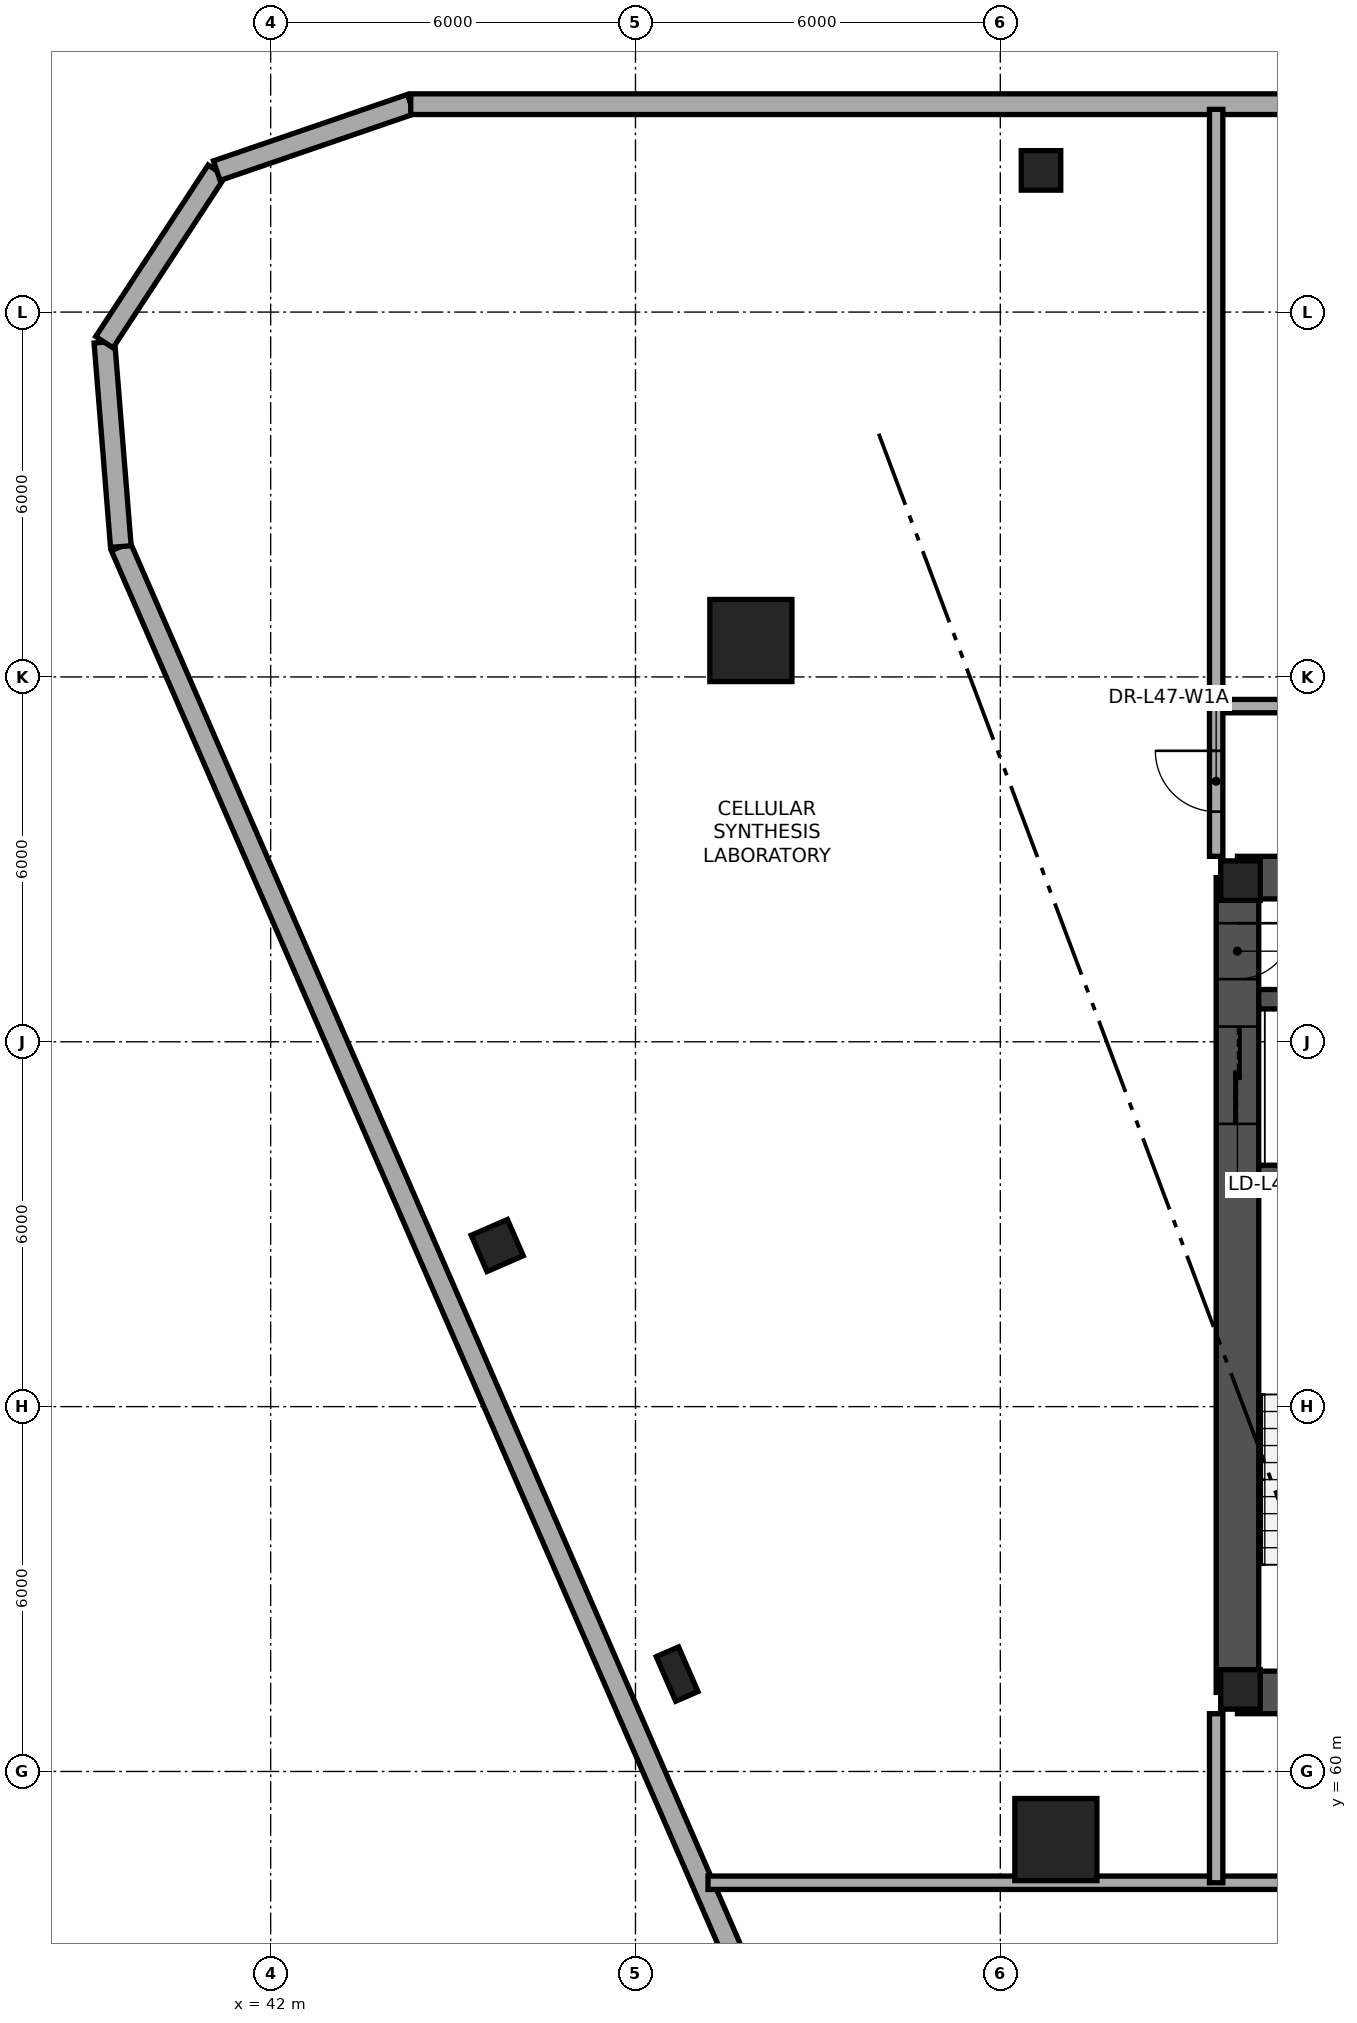
"""IFC4 building model, lengths in metres.
Left out: names, types, materials, properties, quantities, classifications, styles, units other than length and angle.
Written with IfcOpenShell. Run it as: python <this file> out.ifc"""

import sys

from ifc_helpers import new_model, si_unit, direction, frame, frame_2d, origin, origin_2d, place, context, subcontext, project, spatial, rectangle, extrude, element, fill, save


model = new_model("IFC4")
c1 = context("Model", 3, precision=1e-05, world=origin(), true_north=direction((0.0, 1.0)))
c2 = subcontext(c1, "Body", "Model", "MODEL_VIEW")
j1 = project(units=[si_unit("LENGTHUNIT", "METRE"), si_unit("PLANEANGLEUNIT", "RADIAN")], contexts=[c1])
p1 = place(None, origin())
s1 = spatial("IfcSite", under=j1, at=p1, CompositionType="ELEMENT")
p2 = place(p1, origin())
s2 = spatial("IfcBuilding", under=s1, at=p2, CompositionType="ELEMENT")
p3 = place(p2, frame((0.0, 0.0, 179.4)))
s3 = spatial("IfcBuildingStorey", under=s2, at=p3, CompositionType="ELEMENT", Elevation=179.4)
p4 = place(p3, frame((57.9, 61.3, 0.0), z_axis=(0.0, 0.0, 1.0), x_axis=(1.0, 0.0, 0.0)))
e1 = element("IfcWall", 1, at=p4, inside=s3, PredefinedType="SHEAR", context=c2, shape_type="SweptSolid", body=[
    extrude(rectangle(XDim=16.2, YDim=0.7, at=frame_2d((8.1, 0.0))), origin(), (0.0, 0.0, 1.0), 3.65),
])
p5 = place(p4, frame((1.35, 0.0, 0.0)))
e2 = element("IfcOpeningElement", 2, at=p5, cuts=e1, PredefinedType="OPENING", context=c2, shape_type="SweptSolid", body=[
    extrude(rectangle(XDim=1.15, YDim=2.15, at=frame_2d((0.575, 1.075))), frame((0.0, 0.36, 0.0), z_axis=(0.0, -1.0, 0.0), x_axis=(1.0, 0.0, 0.0)), (0.0, 0.0, 1.0), 0.72),
])
p6 = place(p4, frame((6.1, 0.0, 0.0)))
e3 = element("IfcOpeningElement", 3, at=p6, cuts=e1, PredefinedType="OPENING", context=c2, shape_type="SweptSolid", body=[
    extrude(rectangle(XDim=1.6, YDim=2.15, at=frame_2d((0.8, 1.075))), frame((0.0, 0.36, 0.0), z_axis=(0.0, -1.0, 0.0), x_axis=(1.0, 0.0, 0.0)), (0.0, 0.0, 1.0), 0.72),
])
p7 = place(p4, frame((13.55, 0.0, 0.0)))
e4 = element("IfcOpeningElement", 4, at=p7, cuts=e1, PredefinedType="OPENING", context=c2, shape_type="SweptSolid", body=[
    extrude(rectangle(XDim=1.15, YDim=2.15, at=frame_2d((0.575, 1.075))), frame((0.0, 0.36, 0.0), z_axis=(0.0, -1.0, 0.0), x_axis=(1.0, 0.0, 0.0)), (0.0, 0.0, 1.0), 0.72),
])
p8 = place(p3, frame((64.85, 74.7, 0.0), z_axis=(0.0, 0.0, 1.0), x_axis=(-1.0, 0.0, 0.0)))
e5 = element("IfcWall", 5, at=p8, inside=s3, PredefinedType="SHEAR", context=c2, shape_type="SweptSolid", body=[
    extrude(rectangle(XDim=6.95, YDim=0.7, at=frame_2d((3.475, 0.0))), origin(), (0.0, 0.0, 1.0), 3.65),
])
p9 = place(p3, frame((57.9, 74.7, 0.0), z_axis=(0.0, 0.0, 1.0), x_axis=(0.0, -1.0, 0.0)))
e6 = element("IfcWall", 6, at=p9, inside=s3, PredefinedType="SHEAR", context=c2, shape_type="SweptSolid", body=[
    extrude(rectangle(XDim=13.4, YDim=0.7, at=frame_2d((6.7, 0.0))), origin(), (0.0, 0.0, 1.0), 3.65),
])
p10 = place(p9, frame((0.75, 0.0, 0.0)))
e7 = element("IfcOpeningElement", 7, at=p10, cuts=e6, PredefinedType="OPENING", context=c2, shape_type="SweptSolid", body=[
    extrude(rectangle(XDim=0.92, YDim=2.05, at=frame_2d((0.46, 1.025))), frame((0.0, 0.36, 0.0), z_axis=(0.0, -1.0, 0.0), x_axis=(1.0, 0.0, 0.0)), (0.0, 0.0, 1.0), 0.72),
])
p11 = place(p9, frame((2.45, 0.0, 0.0)))
e8 = element("IfcOpeningElement", 8, at=p11, cuts=e6, PredefinedType="OPENING", context=c2, shape_type="SweptSolid", body=[
    extrude(rectangle(XDim=1.6, YDim=2.3, at=frame_2d((0.8, 1.15))), frame((0.0, 0.36, 0.0), z_axis=(0.0, -1.0, 0.0), x_axis=(1.0, 0.0, 0.0)), (0.0, 0.0, 1.0), 0.72),
])
for number, where, z_axis, x_axis in (
    (9, (58.25, 69.81, 0.0), (0.0, 0.0, 1.0), (1.0, 0.0, 0.0)),
    (10, (58.25, 72.7, 0.0), (0.0, 0.0, 1.0), (1.0, 0.0, 0.0)),
):
    element("IfcWall", number, at=place(p3, frame(where, z_axis=z_axis, x_axis=x_axis)), inside=s3, PredefinedType="SHEAR", context=c2, shape_type="SweptSolid", body=[
        extrude(rectangle(XDim=3.84, YDim=0.32, at=frame_2d((1.92, 0.0))), origin(), (0.0, 0.0, 1.0), 3.65),
    ])
for number, where, z_axis, x_axis in (
    (11, (57.95, 61.35, 0.0), (0.0, 0.0, 1.0), (1.0, 0.0, 0.0)),
    (12, (57.95, 74.65, 0.0), (0.0, 0.0, 1.0), (1.0, 0.0, 0.0)),
):
    element("IfcColumn", number, at=place(p3, frame(where, z_axis=z_axis, x_axis=x_axis)), inside=s3, PredefinedType="COLUMN", context=c2, shape_type="SweptSolid", body=[
        extrude(rectangle(XDim=0.65, YDim=0.65, at=origin_2d()), origin(), (0.0, 0.0, 1.0), 3.65),
    ])
for number, where, z_axis, x_axis in (
    (13, (49.898, 78.599, 0.0), (0.0, 0.0, 1.0), (1.0, 0.0, 0.0)),
    (14, (54.914, 58.88, 0.0), (0.0, 0.0, 1.0), (1.0, 0.0, 0.0)),
):
    element("IfcColumn", number, at=place(p3, frame(where, z_axis=z_axis, x_axis=x_axis)), inside=s3, PredefinedType="COLUMN", context=c2, shape_type="SweptSolid", body=[
        extrude(rectangle(XDim=1.35, YDim=1.35, at=origin_2d()), origin(), (0.0, 0.0, 1.0), 3.65),
    ])
p12 = place(p3, frame((54.62, 86.391, 0.003), z_axis=(0.026841076243, -0.033534611465, 0.999077067328), x_axis=(-0.780716755404, -0.624885067698, 0.0)))
e15 = element("IfcColumn", 15, at=p12, inside=s3, PredefinedType="COLUMN", context=c2, shape_type="SweptSolid", body=[
    extrude(rectangle(XDim=0.65, YDim=0.65, at=origin_2d()), origin(), (0.0, 0.0, 1.0), 3.647),
])
p13 = place(p3, frame((45.654, 68.66, 0.003), z_axis=(0.039229493406, -0.00569028488, 0.999214024874), x_axis=(0.963969673558, 0.263517553175, -0.036345118363)))
e16 = element("IfcColumn", 16, at=p13, inside=s3, PredefinedType="COLUMN", context=c2, shape_type="SweptSolid", body=[
    extrude(rectangle(XDim=0.65, YDim=0.65, at=origin_2d()), origin(), (0.0, 0.0, 1.0), 3.647),
])
p14 = place(p3, frame((48.626, 61.582, 0.003), z_axis=(0.032006476949, 0.010512587617, 0.999432374368), x_axis=(0.746040809026, 0.665183443624, -0.030888470278)))
e17 = element("IfcColumn", 17, at=p14, inside=s3, PredefinedType="PILASTER", context=c2, shape_type="SweptSolid", body=[
    extrude(rectangle(XDim=0.8, YDim=0.4, at=origin_2d()), origin(), (0.0, 0.0, 1.0), 3.646),
])
p15 = place(p3, frame((61.232, 30.296, 0.0), z_axis=(0.0, 0.0, 1.0), x_axis=(-0.399091286562, 0.916911197985, 0.0)))
e18 = element("IfcWall", 18, at=p15, inside=s3, PredefinedType="STANDARD", context=c2, shape_type="SweptSolid", body=[
    extrude(rectangle(XDim=54.364, YDim=0.34, at=frame_2d((27.182, 0.0))), origin(), (0.0, 0.0, 1.0), 0.85),
])
for number, where, z_axis, x_axis in (
    (19, (39.536, 80.144, 0.0), (0.0, 0.0, 1.0), (-0.08, 0.997, 0.0)),
    (20, (39.265, 83.505, 0.0), (0.0, 0.0, 1.0), (0.548, 0.836, 0.0)),
):
    element("IfcWall", number, at=place(p3, frame(where, z_axis=z_axis, x_axis=x_axis)), inside=s3, PredefinedType="STANDARD", context=c2, shape_type="SweptSolid", body=[
        extrude(rectangle(XDim=3.372, YDim=0.34, at=frame_2d((1.686, 0.0))), origin(), (0.0, 0.0, 1.0), 3.4),
    ])
p16 = place(p3, frame((41.114, 86.325, 0.0), z_axis=(0.0, 0.0, 1.0), x_axis=(0.945963079191, 0.324274348056, 0.0)))
e21 = element("IfcWall", 21, at=p16, inside=s3, PredefinedType="STANDARD", context=c2, shape_type="SweptSolid", body=[
    extrude(rectangle(XDim=3.372, YDim=0.34, at=frame_2d((1.686, 0.0))), origin(), (0.0, 0.0, 1.0), 3.4),
])
p17 = place(p3, frame((44.304, 87.419, 0.0), z_axis=(0.0, 0.0, 1.0), x_axis=(1.0, 0.0, 0.0)))
e22 = element("IfcWall", 22, at=p17, inside=s3, PredefinedType="STANDARD", context=c2, shape_type="SweptSolid", body=[
    extrude(rectangle(XDim=43.393, YDim=0.34, at=frame_2d((21.696, 0.0))), origin(), (0.0, 0.0, 1.0), 0.85),
])
p18 = place(p3, frame((57.55, 77.52, 0.0), z_axis=(0.0, 0.0, 1.0), x_axis=(1.0, 0.0, 0.0)))
e23 = element("IfcWall", 23, at=p18, inside=s3, PredefinedType="PARTITIONING", context=c2, shape_type="SweptSolid", body=[
    extrude(rectangle(XDim=33.679, YDim=0.22, at=frame_2d((16.84, 0.0))), origin(), (0.0, 0.0, 1.0), 2.6),
])
p19 = place(p18, frame((11.21, 0.0, 0.0)))
e24 = element("IfcOpeningElement", 24, at=p19, cuts=e23, PredefinedType="OPENING", context=c2, shape_type="SweptSolid", body=[
    extrude(rectangle(XDim=0.98, YDim=2.1, at=frame_2d((0.49, 1.05))), frame((0.0, 0.12, 0.0), z_axis=(0.0, -1.0, 0.0), x_axis=(1.0, 0.0, 0.0)), (0.0, 0.0, 1.0), 0.24),
])
p20 = place(p18, frame((14.035, 0.0, 0.0)))
e25 = element("IfcOpeningElement", 25, at=p20, cuts=e23, PredefinedType="OPENING", context=c2, shape_type="SweptSolid", body=[
    extrude(rectangle(XDim=0.98, YDim=2.1, at=frame_2d((0.49, 1.05))), frame((0.0, 0.12, 0.0), z_axis=(0.0, -1.0, 0.0), x_axis=(1.0, 0.0, 0.0)), (0.0, 0.0, 1.0), 0.24),
])
p21 = place(p18, frame((3.1, 0.0, 0.0)))
e26 = element("IfcOpeningElement", 26, at=p21, cuts=e23, PredefinedType="OPENING", context=c2, shape_type="SweptSolid", body=[
    extrude(rectangle(XDim=1.0, YDim=2.1, at=frame_2d((0.5, 1.05))), frame((0.0, 0.12, 0.0), z_axis=(0.0, -1.0, 0.0), x_axis=(1.0, 0.0, 0.0)), (0.0, 0.0, 1.0), 0.24),
])
p22 = place(p18, frame((8.135, 0.0, 0.0)))
e27 = element("IfcOpeningElement", 27, at=p22, cuts=e23, PredefinedType="OPENING", context=c2, shape_type="SweptSolid", body=[
    extrude(rectangle(XDim=1.0, YDim=2.1, at=frame_2d((0.5, 1.05))), frame((0.0, 0.12, 0.0), z_axis=(0.0, -1.0, 0.0), x_axis=(1.0, 0.0, 0.0)), (0.0, 0.0, 1.0), 0.24),
])
p23 = place(p18, frame((21.401, 0.0, 0.0)))
e28 = element("IfcOpeningElement", 28, at=p23, cuts=e23, PredefinedType="OPENING", context=c2, shape_type="SweptSolid", body=[
    extrude(rectangle(XDim=1.0, YDim=2.1, at=frame_2d((0.5, 1.05))), frame((0.0, 0.12, 0.0), z_axis=(0.0, -1.0, 0.0), x_axis=(1.0, 0.0, 0.0)), (0.0, 0.0, 1.0), 0.24),
])
p24 = place(p18, frame((29.405, 0.0, 0.0)))
e29 = element("IfcOpeningElement", 29, at=p24, cuts=e23, PredefinedType="OPENING", context=c2, shape_type="SweptSolid", body=[
    extrude(rectangle(XDim=1.0, YDim=2.1, at=frame_2d((0.5, 1.05))), frame((0.0, 0.12, 0.0), z_axis=(0.0, -1.0, 0.0), x_axis=(1.0, 0.0, 0.0)), (0.0, 0.0, 1.0), 0.24),
])
p25 = place(p3, frame((49.193, 58.17, 0.0), z_axis=(0.0, 0.0, 1.0), x_axis=(1.0, 0.0, 0.0)))
e30 = element("IfcWall", 30, at=p25, inside=s3, PredefinedType="PARTITIONING", context=c2, shape_type="SweptSolid", body=[
    extrude(rectangle(XDim=27.027, YDim=0.22, at=frame_2d((13.514, 0.0))), origin(), (0.0, 0.0, 1.0), 2.6),
])
p26 = place(p25, frame((12.764, 0.0, 0.0)))
e31 = element("IfcOpeningElement", 31, at=p26, cuts=e30, PredefinedType="OPENING", context=c2, shape_type="SweptSolid", body=[
    extrude(rectangle(XDim=1.5, YDim=2.2, at=frame_2d((0.75, 1.1))), frame((0.0, 0.12, 0.0), z_axis=(0.0, -1.0, 0.0), x_axis=(1.0, 0.0, 0.0)), (0.0, 0.0, 1.0), 0.24),
])
p27 = place(p3, frame((57.55, 75.05, 0.0), z_axis=(0.0, 0.0, 1.0), x_axis=(0.0, 1.0, 0.0)))
e32 = element("IfcWall", 32, at=p27, inside=s3, PredefinedType="PARTITIONING", context=c2, shape_type="SweptSolid", body=[
    extrude(rectangle(XDim=12.284, YDim=0.22, at=frame_2d((6.142, 0.0))), origin(), (0.0, 0.0, 1.0), 2.6),
])
p28 = place(p27, frame((0.735, 0.0, 0.0)))
e33 = element("IfcOpeningElement", 33, at=p28, cuts=e32, PredefinedType="OPENING", context=c2, shape_type="SweptSolid", body=[
    extrude(rectangle(XDim=1.0, YDim=2.1, at=frame_2d((0.5, 1.05))), frame((0.0, 0.12, 0.0), z_axis=(0.0, -1.0, 0.0), x_axis=(1.0, 0.0, 0.0)), (0.0, 0.0, 1.0), 0.24),
])
p29 = place(p3, frame((57.55, 58.17, 0.0), z_axis=(0.0, 0.0, 1.0), x_axis=(0.0, 1.0, 0.0)))
e34 = element("IfcWall", 34, at=p29, inside=s3, PredefinedType="PARTITIONING", context=c2, shape_type="SweptSolid", body=[
    extrude(rectangle(XDim=2.78, YDim=0.22, at=frame_2d((1.39, 0.0))), origin(), (0.0, 0.0, 1.0), 2.78),
])
p30 = place(p10, origin())
e35 = element("IfcDoor", 35, at=p30, inside=s3, OperationType="SINGLE_SWING_LEFT", PredefinedType="DOOR", context=c2, shape_type="SweptSolid", body=[
    extrude(rectangle(XDim=0.92, YDim=2.05, at=frame_2d((0.46, 1.025))), frame((0.0, 0.025, 0.0), z_axis=(0.0, -1.0, 0.0), x_axis=(1.0, 0.0, 0.0)), (0.0, 0.0, 1.0), 0.05),
])
fill(e7, e35)
p31 = place(p11, origin())
e36 = element("IfcDoor", 36, at=p31, inside=s3, OperationType="DOUBLE_DOOR_SLIDING", PredefinedType="DOOR", context=c2, shape_type="SweptSolid", body=[
    extrude(rectangle(XDim=1.6, YDim=2.3, at=frame_2d((0.8, 1.15))), frame((0.0, 0.025, 0.0), z_axis=(0.0, -1.0, 0.0), x_axis=(1.0, 0.0, 0.0)), (0.0, 0.0, 1.0), 0.05),
])
fill(e8, e36)
p32 = place(p28, origin())
e37 = element("IfcDoor", 37, at=p32, inside=s3, OperationType="SINGLE_SWING_RIGHT", PredefinedType="DOOR", context=c2, shape_type="SweptSolid", body=[
    extrude(rectangle(XDim=1.0, YDim=2.1, at=frame_2d((0.5, 1.05))), frame((0.0, 0.025, 0.0), z_axis=(0.0, -1.0, 0.0), x_axis=(1.0, 0.0, 0.0)), (0.0, 0.0, 1.0), 0.05),
])
fill(e33, e37)
save(model, sys.argv[1])
